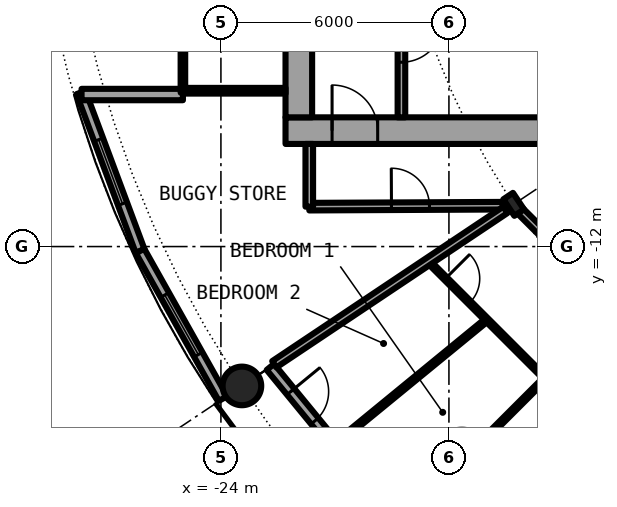
"""IFC4 building model, lengths in metres.
Left out: names, types, materials, properties, quantities, classifications, styles, units other than length and angle.
Written with IfcOpenShell. Run it as: python <this file> out.ifc"""

import sys

from ifc_helpers import new_model, si_unit, direction, frame, frame_2d, origin, origin_2d, place, context, subcontext, project, spatial, rectangle, hollow_circle, i_section, extrude, element, fill, save


model = new_model("IFC4")
c1 = context("Model", 3, precision=1e-05, world=origin(), true_north=direction((0.0, 1.0)))
c2 = subcontext(c1, "Body", "Model", "MODEL_VIEW")
j1 = project(units=[si_unit("LENGTHUNIT", "METRE"), si_unit("PLANEANGLEUNIT", "RADIAN")], contexts=[c1])
p1 = place(None, origin())
s1 = spatial("IfcSite", under=j1, at=p1, CompositionType="ELEMENT")
p2 = place(p1, origin())
s2 = spatial("IfcBuilding", under=s1, at=p2, CompositionType="ELEMENT")
p3 = place(p2, frame((0.0, 0.0, 63.6)))
s3 = spatial("IfcBuildingStorey", under=s2, at=p3, CompositionType="ELEMENT", Elevation=63.6)
p4 = place(p3, frame((-23.448, -15.667, 0.0), z_axis=(0.0, 0.0, 1.0), x_axis=(1.0, 0.0, 0.0)))
e1 = element("IfcColumn", 1, at=p4, inside=s3, PredefinedType="COLUMN", context=c2, shape_type="SweptSolid", body=[
    extrude(hollow_circle(Radius=0.508, WallThickness=0.04, at=origin_2d()), origin(), (0.0, 0.0, 1.0), 3.05),
])
p5 = place(p3, frame((-16.297, -10.889, 0.0), z_axis=(0.0, 0.0, 1.0), x_axis=(-0.831469612303, -0.55557023302, 0.0)))
e2 = element("IfcColumn", 2, at=p5, inside=s3, PredefinedType="COLUMN", context=c2, shape_type="SweptSolid", body=[
    extrude(i_section(OverallWidth=0.306, OverallDepth=0.524, WebThickness=0.021, FlangeThickness=0.04, FilletRadius=0.027, at=origin_2d()), origin(), (0.0, 0.0, 1.0), 3.05),
])
p6 = place(p3, frame((-22.699, -15.167, 0.0), z_axis=(0.0, 0.0, 1.0), x_axis=(0.634382322723, -0.773019449054, 0.0)))
e3 = element("IfcWall", 3, at=p6, inside=s3, PredefinedType="SOLIDWALL", context=c2, shape_type="SweptSolid", body=[
    extrude(rectangle(XDim=5.352, YDim=0.25, at=frame_2d((2.676, 0.0))), origin(), (0.0, 0.0, 1.0), 2.7),
])
p7 = place(p6, frame((0.841, 0.0, 0.0)))
e4 = element("IfcOpeningElement", 4, at=p7, cuts=e3, PredefinedType="OPENING", context=c2, shape_type="SweptSolid", body=[
    extrude(rectangle(XDim=1.0, YDim=2.2, at=frame_2d((0.5, 1.1))), frame((0.0, 0.135, 0.0), z_axis=(0.0, -1.0, 0.0), x_axis=(1.0, 0.0, 0.0)), (0.0, 0.0, 1.0), 0.27),
])
p8 = place(p6, frame((3.111, 0.0, 0.3)))
e5 = element("IfcOpeningElement", 5, at=p8, cuts=e3, PredefinedType="OPENING", context=c2, shape_type="SweptSolid", body=[
    extrude(rectangle(XDim=1.8, YDim=2.1, at=frame_2d((0.9, 1.05))), frame((0.0, 0.135, 0.0), z_axis=(0.0, -1.0, 0.0), x_axis=(1.0, 0.0, 0.0)), (0.0, 0.0, 1.0), 0.27),
])
p9 = place(p3, frame((-27.682, -7.945, 0.0), z_axis=(0.0, 0.0, 1.0), x_axis=(0.349247811493, -0.937030397675, 0.0)))
e6 = element("IfcWall", 6, at=p9, inside=s3, PredefinedType="SOLIDWALL", context=c2, shape_type="SweptSolid", body=[
    extrude(rectangle(XDim=4.452, YDim=0.25, at=frame_2d((2.226, 0.0))), origin(), (0.0, 0.0, 1.0), 2.7),
])
p10 = place(p9, frame((1.327, 0.0, 0.3)))
e7 = element("IfcOpeningElement", 7, at=p10, cuts=e6, PredefinedType="OPENING", context=c2, shape_type="SweptSolid", body=[
    extrude(rectangle(XDim=1.8, YDim=2.1, at=frame_2d((0.9, 1.05))), frame((0.0, 0.135, 0.0), z_axis=(0.0, -1.0, 0.0), x_axis=(1.0, 0.0, 0.0)), (0.0, 0.0, 1.0), 0.27),
])
p11 = place(p3, frame((-26.127, -12.117, 0.0), z_axis=(0.0, 0.0, 1.0), x_axis=(0.489696356642, -0.871893042919, 0.0)))
e8 = element("IfcWall", 8, at=p11, inside=s3, PredefinedType="SOLIDWALL", context=c2, shape_type="SweptSolid", body=[
    extrude(rectangle(XDim=4.454, YDim=0.25, at=frame_2d((2.227, 0.0))), origin(), (0.0, 0.0, 1.0), 2.7),
])
p12 = place(p11, frame((1.327, 0.0, 0.3)))
e9 = element("IfcOpeningElement", 9, at=p12, cuts=e8, PredefinedType="OPENING", context=c2, shape_type="SweptSolid", body=[
    extrude(rectangle(XDim=1.8, YDim=2.1, at=frame_2d((0.9, 1.05))), frame((0.0, 0.135, 0.0), z_axis=(0.0, -1.0, 0.0), x_axis=(1.0, 0.0, 0.0)), (0.0, 0.0, 1.0), 0.27),
])
p13 = place(p3, frame((-25.0, -8.0, 0.0), z_axis=(0.0, 0.0, 1.0), x_axis=(-1.0, 0.0, 0.0)))
e10 = element("IfcWall", 10, at=p13, inside=s3, PredefinedType="SOLIDWALL", context=c2, shape_type="SweptSolid", body=[
    extrude(rectangle(XDim=2.667, YDim=0.3, at=frame_2d((1.333, 0.0))), origin(), (0.0, 0.0, 1.0), 2.7),
])
p14 = place(p3, frame((-22.3, -8.95, 0.0), z_axis=(0.0, 0.0, 1.0), x_axis=(1.0, 0.0, 0.0)))
e11 = element("IfcWall", 11, at=p14, inside=s3, PredefinedType="SHEAR", context=c2, shape_type="SweptSolid", body=[
    extrude(rectangle(XDim=14.0, YDim=0.7, at=frame_2d((7.0, 0.0))), origin(), (0.0, 0.0, 1.0), 3.05),
])
p15 = place(p14, frame((1.225, 0.0, 0.0)))
e12 = element("IfcOpeningElement", 12, at=p15, cuts=e11, PredefinedType="OPENING", context=c2, shape_type="SweptSolid", body=[
    extrude(rectangle(XDim=1.2, YDim=2.3, at=frame_2d((0.6, 1.15))), frame((0.0, 0.36, 0.0), z_axis=(0.0, -1.0, 0.0), x_axis=(1.0, 0.0, 0.0)), (0.0, 0.0, 1.0), 0.72),
])
p16 = place(p3, frame((-21.95, -8.6, 0.0), z_axis=(0.0, 0.0, 1.0), x_axis=(0.0, 1.0, 0.0)))
e13 = element("IfcWall", 13, at=p16, inside=s3, PredefinedType="SHEAR", context=c2, shape_type="SweptSolid", body=[
    extrude(rectangle(XDim=17.2, YDim=0.7, at=frame_2d((8.6, 0.0))), origin(), (0.0, 0.0, 1.0), 3.05),
])
p17 = place(p16, frame((7.7, 0.0, 0.0)))
e14 = element("IfcOpeningElement", 14, at=p17, cuts=e13, PredefinedType="OPENING", context=c2, shape_type="SweptSolid", body=[
    extrude(rectangle(XDim=1.8, YDim=2.3, at=frame_2d((0.9, 1.15))), frame((0.0, 0.36, 0.0), z_axis=(0.0, -1.0, 0.0), x_axis=(1.0, 0.0, 0.0)), (0.0, 0.0, 1.0), 0.72),
])
p18 = place(p3, frame((-19.25, -1.575, 0.0), z_axis=(0.0, 0.0, 1.0), x_axis=(0.0, -1.0, 0.0)))
e15 = element("IfcWall", 15, at=p18, inside=s3, PredefinedType="SOLIDWALL", context=c2, shape_type="SweptSolid", body=[
    extrude(rectangle(XDim=7.025, YDim=0.2, at=frame_2d((3.513, 0.0))), origin(), (0.0, 0.0, 1.0), 2.7),
])
p19 = place(p18, frame((4.475, 0.0, 0.0)))
e16 = element("IfcOpeningElement", 16, at=p19, cuts=e15, PredefinedType="OPENING", context=c2, shape_type="SweptSolid", body=[
    extrude(rectangle(XDim=1.1, YDim=2.3, at=frame_2d((0.55, 1.15))), frame((0.0, 0.11, 0.0), z_axis=(0.0, -1.0, 0.0), x_axis=(1.0, 0.0, 0.0)), (0.0, 0.0, 1.0), 0.22),
])
p20 = place(p3, frame((-22.3, -7.9, 0.0), z_axis=(0.0, 0.0, 1.0), x_axis=(-1.0, 0.0, 0.0)))
e17 = element("IfcWall", 17, at=p20, inside=s3, PredefinedType="PARTITIONING", context=c2, shape_type="SweptSolid", body=[
    extrude(rectangle(XDim=2.64, YDim=0.15, at=frame_2d((1.32, 0.0))), origin(), (0.0, 0.0, 1.0), 2.7),
])
p21 = place(p3, frame((-25.0, -7.95, 0.0), z_axis=(0.0, 0.0, 1.0), x_axis=(0.0, 1.0, 0.0)))
e18 = element("IfcWall", 18, at=p21, inside=s3, PredefinedType="PARTITIONING", context=c2, shape_type="SweptSolid", body=[
    extrude(rectangle(XDim=15.9, YDim=0.12, at=frame_2d((7.95, 0.0))), origin(), (0.0, 0.0, 1.0), 2.7),
])
p22 = place(p21, frame((6.75, 0.0, 0.0)))
e19 = element("IfcOpeningElement", 19, at=p22, cuts=e18, PredefinedType="OPENING", context=c2, shape_type="SweptSolid", body=[
    extrude(rectangle(XDim=2.4, YDim=2.3, at=frame_2d((1.2, 1.15))), frame((0.0, 0.07, 0.0), z_axis=(0.0, -1.0, 0.0), x_axis=(1.0, 0.0, 0.0)), (0.0, 0.0, 1.0), 0.14),
])
p23 = place(p21, frame((11.55, 0.0, 0.1)))
e20 = element("IfcOpeningElement", 20, at=p23, cuts=e18, PredefinedType="OPENING", context=c2, shape_type="SweptSolid", body=[
    extrude(rectangle(XDim=3.4, YDim=2.35, at=frame_2d((1.7, 1.175))), frame((0.0, 0.07, 0.0), z_axis=(0.0, -1.0, 0.0), x_axis=(1.0, 0.0, 0.0)), (0.0, 0.0, 1.0), 0.14),
])
p24 = place(p21, frame((0.95, 0.0, 0.1)))
e21 = element("IfcOpeningElement", 21, at=p24, cuts=e18, PredefinedType="OPENING", context=c2, shape_type="SweptSolid", body=[
    extrude(rectangle(XDim=3.4, YDim=2.35, at=frame_2d((1.7, 1.175))), frame((0.0, 0.07, 0.0), z_axis=(0.0, -1.0, 0.0), x_axis=(1.0, 0.0, 0.0)), (0.0, 0.0, 1.0), 0.14),
])
p25 = place(p3, frame((-18.545, -12.386, 0.0), z_axis=(0.0, 0.0, 1.0), x_axis=(0.707106781187, -0.707106781187, 0.0)))
e22 = element("IfcWall", 22, at=p25, inside=s3, PredefinedType="PARTITIONING", context=c2, shape_type="SweptSolid", body=[
    extrude(rectangle(XDim=4.351, YDim=0.1, at=frame_2d((2.176, 0.0))), origin(), (0.0, 0.0, 1.0), 2.7),
])
p26 = place(p25, frame((0.644, 0.0, 0.0)))
e23 = element("IfcOpeningElement", 23, at=p26, cuts=e22, PredefinedType="OPENING", context=c2, shape_type="SweptSolid", body=[
    extrude(rectangle(XDim=0.9, YDim=2.3, at=frame_2d((0.45, 1.15))), frame((0.0, 0.06, 0.0), z_axis=(0.0, -1.0, 0.0), x_axis=(1.0, 0.0, 0.0)), (0.0, 0.0, 1.0), 0.12),
])
p27 = place(p3, frame((-16.186, -11.0, 0.0), z_axis=(0.0, 0.0, 1.0), x_axis=(0.707106781187, -0.707106781187, 0.0)))
e24 = element("IfcWall", 24, at=p27, inside=s3, PredefinedType="PARTITIONING", context=c2, shape_type="SweptSolid", body=[
    extrude(rectangle(XDim=7.334, YDim=0.2, at=frame_2d((3.667, 0.0))), origin(), (0.0, 0.0, 1.0), 2.38),
])
p28 = place(p27, frame((2.211, 0.0, 0.0)))
e25 = element("IfcOpeningElement", 25, at=p28, cuts=e24, PredefinedType="OPENING", context=c2, shape_type="SweptSolid", body=[
    extrude(rectangle(XDim=1.0, YDim=2.3, at=frame_2d((0.5, 1.15))), frame((0.0, 0.11, 0.0), z_axis=(0.0, -1.0, 0.0), x_axis=(1.0, 0.0, 0.0)), (0.0, 0.0, 1.0), 0.22),
])
p29 = place(p3, frame((-21.675, -10.95, 0.0), z_axis=(0.0, 0.0, 1.0), x_axis=(0.999988019025, 0.004895079807, 0.0)))
e26 = element("IfcWall", 26, at=p29, inside=s3, PredefinedType="PARTITIONING", context=c2, shape_type="SweptSolid", body=[
    extrude(rectangle(XDim=5.087, YDim=0.2, at=frame_2d((2.543, 0.0))), origin(), (0.0, 0.0, 1.0), 2.7),
])
p30 = place(p29, frame((2.163, 0.0, 0.0)))
e27 = element("IfcOpeningElement", 27, at=p30, cuts=e26, PredefinedType="OPENING", context=c2, shape_type="SweptSolid", body=[
    extrude(rectangle(XDim=1.0, YDim=2.3, at=frame_2d((0.5, 1.15))), frame((0.0, 0.11, 0.0), z_axis=(0.0, -1.0, 0.0), x_axis=(1.0, 0.0, 0.0)), (0.0, 0.0, 1.0), 0.22),
])
p31 = place(p3, frame((-22.595, -15.097, 0.0), z_axis=(0.0, 0.0, 1.0), x_axis=(0.831505405283, 0.555516661303, 0.0)))
e28 = element("IfcWall", 28, at=p31, inside=s3, PredefinedType="PARTITIONING", context=c2, shape_type="SweptSolid", body=[
    extrude(rectangle(XDim=7.312, YDim=0.2, at=frame_2d((3.656, 0.0))), origin(), (0.0, 0.0, 1.0), 2.7),
])
p32 = place(p3, frame((-21.023, -17.22, 0.0), z_axis=(0.0, 0.0, 1.0), x_axis=(0.773517471898, 0.633774976367, 0.0)))
e29 = element("IfcWall", 29, at=p32, inside=s3, PredefinedType="PARTITIONING", context=c2, shape_type="SweptSolid", body=[
    extrude(rectangle(XDim=5.196, YDim=0.1, at=frame_2d((2.598, 0.0))), origin(), (0.0, 0.0, 1.0), 2.7),
])
p33 = place(p3, frame((-19.216, -19.216, 0.0), z_axis=(0.0, 0.0, 1.0), x_axis=(0.707106781187, 0.707106781187, 0.0)))
e30 = element("IfcWall", 30, at=p33, inside=s3, PredefinedType="PARTITIONING", context=c2, shape_type="SweptSolid", body=[
    extrude(rectangle(XDim=5.305, YDim=0.1, at=frame_2d((2.652, 0.0))), origin(), (0.0, 0.0, 1.0), 2.7),
])
p34 = place(p33, frame((2.202, 0.0, 0.0)))
e31 = element("IfcOpeningElement", 31, at=p34, cuts=e30, PredefinedType="OPENING", context=c2, shape_type="SweptSolid", body=[
    extrude(rectangle(XDim=0.9, YDim=2.3, at=frame_2d((0.45, 1.15))), frame((0.0, 0.06, 0.0), z_axis=(0.0, -1.0, 0.0), x_axis=(1.0, 0.0, 0.0)), (0.0, 0.0, 1.0), 0.12),
])
p35 = place(p3, frame((-21.675, -10.95, 0.0), z_axis=(0.0, 0.0, 1.0), x_axis=(0.0, 1.0, 0.0)))
e32 = element("IfcWall", 32, at=p35, inside=s3, PredefinedType="PARTITIONING", context=c2, shape_type="SweptSolid", body=[
    extrude(rectangle(XDim=1.65, YDim=0.2, at=frame_2d((0.825, 0.0))), origin(), (0.0, 0.0, 1.0), 2.7),
])
p36 = place(p7, origin())
e33 = element("IfcDoor", 33, at=p36, inside=s3, OperationType="SINGLE_SWING_LEFT", PredefinedType="DOOR", context=c2, shape_type="SweptSolid", body=[
    extrude(rectangle(XDim=1.0, YDim=2.2, at=frame_2d((0.5, 1.1))), frame((0.0, 0.025, 0.0), z_axis=(0.0, -1.0, 0.0), x_axis=(1.0, 0.0, 0.0)), (0.0, 0.0, 1.0), 0.05),
])
fill(e4, e33)
p37 = place(p10, origin())
e34 = element("IfcWindow", 34, at=p37, inside=s3, PartitioningType="SINGLE_PANEL", PredefinedType="WINDOW", context=c2, shape_type="SweptSolid", body=[
    extrude(rectangle(XDim=1.8, YDim=2.1, at=frame_2d((0.9, 1.05))), frame((0.0, 0.03, 0.0), z_axis=(0.0, -1.0, 0.0), x_axis=(1.0, 0.0, 0.0)), (0.0, 0.0, 1.0), 0.06),
])
fill(e7, e34)
p38 = place(p12, origin())
e35 = element("IfcWindow", 35, at=p38, inside=s3, PartitioningType="SINGLE_PANEL", PredefinedType="WINDOW", context=c2, shape_type="SweptSolid", body=[
    extrude(rectangle(XDim=1.8, YDim=2.1, at=frame_2d((0.9, 1.05))), frame((0.0, 0.03, 0.0), z_axis=(0.0, -1.0, 0.0), x_axis=(1.0, 0.0, 0.0)), (0.0, 0.0, 1.0), 0.06),
])
fill(e9, e35)
p39 = place(p19, origin())
e36 = element("IfcDoor", 36, at=p39, inside=s3, OperationType="SINGLE_SWING_LEFT", PredefinedType="DOOR", context=c2, shape_type="SweptSolid", body=[
    extrude(rectangle(XDim=1.1, YDim=2.3, at=frame_2d((0.55, 1.15))), frame((0.0, 0.025, 0.0), z_axis=(0.0, -1.0, 0.0), x_axis=(1.0, 0.0, 0.0)), (0.0, 0.0, 1.0), 0.05),
])
fill(e16, e36)
p40 = place(p15, origin())
e37 = element("IfcDoor", 37, at=p40, inside=s3, OperationType="SINGLE_SWING_RIGHT", PredefinedType="DOOR", context=c2, shape_type="SweptSolid", body=[
    extrude(rectangle(XDim=1.2, YDim=2.3, at=frame_2d((0.6, 1.15))), frame((0.0, 0.025, 0.0), z_axis=(0.0, -1.0, 0.0), x_axis=(1.0, 0.0, 0.0)), (0.0, 0.0, 1.0), 0.05),
])
fill(e12, e37)
p41 = place(p24, origin())
e38 = element("IfcWindow", 38, at=p41, inside=s3, PartitioningType="SINGLE_PANEL", PredefinedType="WINDOW", context=c2, shape_type="SweptSolid", body=[
    extrude(rectangle(XDim=3.4, YDim=2.35, at=frame_2d((1.7, 1.175))), frame((0.0, 0.03, 0.0), z_axis=(0.0, -1.0, 0.0), x_axis=(1.0, 0.0, 0.0)), (0.0, 0.0, 1.0), 0.06),
])
fill(e21, e38)
p42 = place(p26, origin())
e39 = element("IfcDoor", 39, at=p42, inside=s3, OperationType="SINGLE_SWING_LEFT", PredefinedType="DOOR", context=c2, shape_type="SweptSolid", body=[
    extrude(rectangle(XDim=0.9, YDim=2.3, at=frame_2d((0.45, 1.15))), frame((0.0, 0.025, 0.0), z_axis=(0.0, -1.0, 0.0), x_axis=(1.0, 0.0, 0.0)), (0.0, 0.0, 1.0), 0.05),
])
fill(e23, e39)
p43 = place(p30, origin())
e40 = element("IfcDoor", 40, at=p43, inside=s3, OperationType="SINGLE_SWING_RIGHT", PredefinedType="DOOR", context=c2, shape_type="SweptSolid", body=[
    extrude(rectangle(XDim=1.0, YDim=2.3, at=frame_2d((0.5, 1.15))), frame((0.0, 0.025, 0.0), z_axis=(0.0, -1.0, 0.0), x_axis=(1.0, 0.0, 0.0)), (0.0, 0.0, 1.0), 0.05),
])
fill(e27, e40)
save(model, sys.argv[1])
